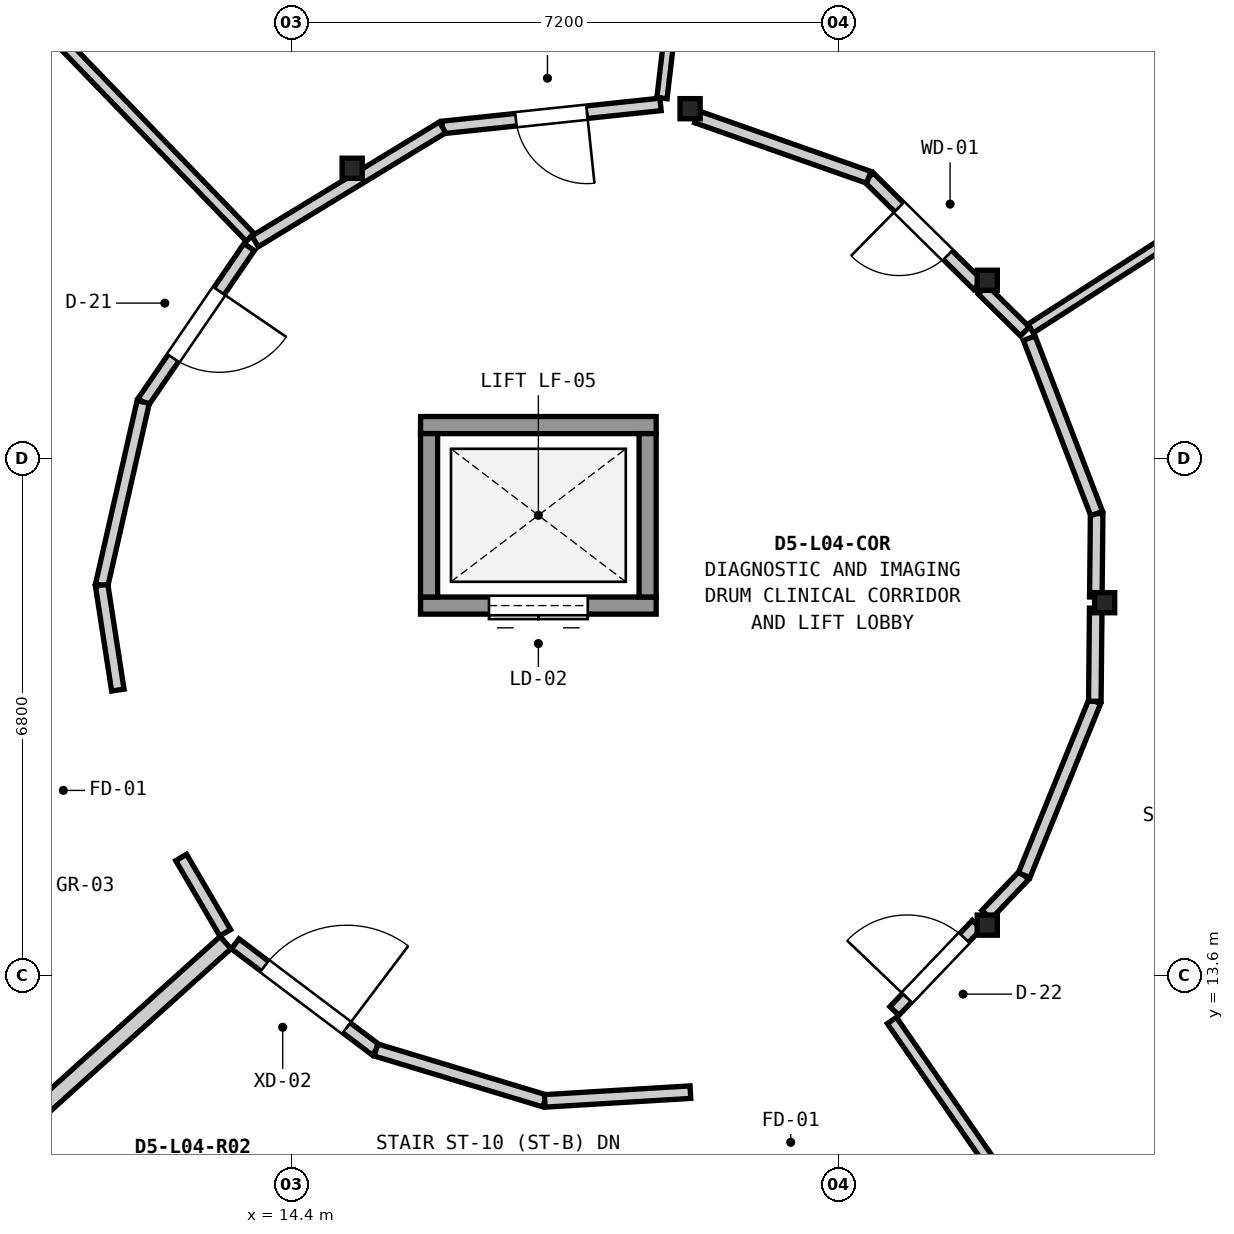
"""IFC4 building model, lengths in metres.
Left out: names, types, materials, properties, quantities, classifications, styles, units other than length and angle.
Written with IfcOpenShell. Run it as: python <this file> out.ifc"""

import sys

from ifc_helpers import new_model, si_unit, direction, frame, frame_2d, origin, origin_2d, place, context, subcontext, project, spatial, rectangle, extrude, element, fill, save


model = new_model("IFC4")
c1 = context("Model", 3, precision=1e-05, world=origin(), true_north=direction((0.0, 1.0)))
c2 = subcontext(c1, "Body", "Model", "MODEL_VIEW")
j1 = project(units=[si_unit("LENGTHUNIT", "METRE"), si_unit("PLANEANGLEUNIT", "RADIAN")], contexts=[c1])
p1 = place(None, origin())
s1 = spatial("IfcSite", under=j1, at=p1, CompositionType="ELEMENT")
p2 = place(p1, origin())
s2 = spatial("IfcBuilding", under=s1, at=p2, CompositionType="ELEMENT")
p3 = place(p2, frame((0.0, 0.0, 17.15)))
s3 = spatial("IfcBuildingStorey", under=s2, at=p3, CompositionType="ELEMENT", Elevation=17.15)
for number, where, z_axis, x_axis in (
    (1, (25.1, 18.5, 0.0), (0.0, 0.0, 1.0), (1.0, 0.0, 0.0)),
    (2, (23.556, 22.742, 0.0), (0.0, 0.0, 1.0), (1.0, 0.0, 0.0)),
    (3, (19.646, 25.0, 0.0), (0.0, 0.0, 1.0), (1.0, 0.0, 0.0)),
    (4, (15.2, 24.216, 0.0), (0.0, 0.0, 1.0), (1.0, 0.0, 0.0)),
    (5, (23.556, 14.258, 0.0), (0.0, 0.0, 1.0), (1.0, 0.0, 0.0)),
):
    element("IfcColumn", number, at=place(p3, frame(where, z_axis=z_axis, x_axis=x_axis)), inside=s3, PredefinedType="COLUMN", context=c2, shape_type="SweptSolid", body=[
        extrude(rectangle(XDim=0.265, YDim=0.265, at=origin_2d()), origin(), (0.0, 0.0, 1.0), 4.2),
    ])
p4 = place(p3, frame((16.1, 18.462, 0.0), z_axis=(0.0, 0.0, 1.0), x_axis=(1.0, 0.0, 0.0)))
e6 = element("IfcWall", 6, at=p4, inside=s3, PredefinedType="SHEAR", context=c2, shape_type="SweptSolid", body=[
    extrude(rectangle(XDim=3.1, YDim=0.225, at=frame_2d((1.55, 0.0))), origin(), (0.0, 0.0, 1.0), 3.96),
])
p5 = place(p4, frame((0.9, 0.0, 0.0)))
e7 = element("IfcOpeningElement", 7, at=p5, cuts=e6, PredefinedType="OPENING", context=c2, shape_type="SweptSolid", body=[
    extrude(rectangle(XDim=1.3, YDim=2.2, at=frame_2d((0.65, 1.1))), frame((0.0, 0.123, 0.0), z_axis=(0.0, -1.0, 0.0), x_axis=(1.0, 0.0, 0.0)), (0.0, 0.0, 1.0), 0.245),
])
p6 = place(p3, frame((16.1, 20.837, 0.0), z_axis=(0.0, 0.0, 1.0), x_axis=(1.0, 0.0, 0.0)))
e8 = element("IfcWall", 8, at=p6, inside=s3, PredefinedType="SHEAR", context=c2, shape_type="SweptSolid", body=[
    extrude(rectangle(XDim=3.1, YDim=0.225, at=frame_2d((1.55, 0.0))), origin(), (0.0, 0.0, 1.0), 3.96),
])
for number, where, z_axis, x_axis in (
    (9, (16.212, 18.575, 0.0), (0.0, 0.0, 1.0), (0.0, 1.0, 0.0)),
    (10, (19.087, 18.575, 0.0), (0.0, 0.0, 1.0), (0.0, 1.0, 0.0)),
):
    element("IfcWall", number, at=place(p3, frame(where, z_axis=z_axis, x_axis=x_axis)), inside=s3, PredefinedType="SHEAR", context=c2, shape_type="SweptSolid", body=[
        extrude(rectangle(XDim=2.15, YDim=0.225, at=frame_2d((1.075, 0.0))), origin(), (0.0, 0.0, 1.0), 3.96),
    ])
p7 = place(p3, frame((13.858, 23.307, 0.0), z_axis=(0.0, 0.0, 1.0), x_axis=(-0.694751659022, 0.719249700928, 0.0)))
e11 = element("IfcWall", 11, at=p7, inside=s3, PredefinedType="PARTITIONING", context=c2, shape_type="SweptSolid", body=[
    extrude(rectangle(XDim=4.574, YDim=0.145, at=frame_2d((2.287, 0.0))), origin(), (0.0, 0.0, 1.0), 3.279),
])
p8 = place(p3, frame((13.534, 14.028, 0.0), z_axis=(0.0, 0.0, 1.0), x_axis=(-0.743275623073, -0.668985312354, 0.0)))
e12 = element("IfcWall", 12, at=p8, inside=s3, PredefinedType="SOLIDWALL", context=c2, shape_type="SweptSolid", body=[
    extrude(rectangle(XDim=4.588, YDim=0.215, at=frame_2d((2.294, 0.0))), origin(), (0.0, 0.0, 1.0), 3.279),
])
p9 = place(p3, frame((22.301, 13.003, 0.0), z_axis=(0.0, 0.0, 1.0), x_axis=(0.56891282969, -0.822397830867, 0.0)))
e13 = element("IfcWall", 13, at=p9, inside=s3, PredefinedType="PARTITIONING", context=c2, shape_type="SweptSolid", body=[
    extrude(rectangle(XDim=4.572, YDim=0.145, at=frame_2d((2.286, 0.0))), origin(), (0.0, 0.0, 1.0), 3.279),
])
p10 = place(p3, frame((24.126, 22.107, 0.0), z_axis=(0.0, 0.0, 1.0), x_axis=(0.841804640469, 0.53978231472, 0.0)))
e14 = element("IfcWall", 14, at=p10, inside=s3, PredefinedType="PLUMBINGWALL", context=c2, shape_type="SweptSolid", body=[
    extrude(rectangle(XDim=4.582, YDim=0.135, at=frame_2d((2.291, 0.0))), origin(), (0.0, 0.0, 1.0), 3.279),
])
p11 = place(p3, frame((19.276, 25.138, 0.0), z_axis=(0.0, 0.0, 1.0), x_axis=(0.116014889471, 0.99324747441, 0.0)))
e15 = element("IfcWall", 15, at=p11, inside=s3, PredefinedType="PLUMBINGWALL", context=c2, shape_type="SweptSolid", body=[
    extrude(rectangle(XDim=4.577, YDim=0.135, at=frame_2d((2.289, 0.0))), origin(), (0.0, 0.0, 1.0), 3.279),
])
p12 = place(p3, frame((13.845, 23.179, 0.0), z_axis=(0.0, 0.0, 1.0), x_axis=(-0.564379150031, -0.825515702462, 0.0)))
e16 = element("IfcWall", 16, at=p12, inside=s3, PredefinedType="PARTITIONING", context=c2, shape_type="SweptSolid", body=[
    extrude(rectangle(XDim=2.47, YDim=0.165, at=frame_2d((1.235, 0.0))), origin(), (0.0, 0.0, 1.0), 3.279),
])
p13 = place(p12, frame((0.7, 0.0, 0.0)))
e17 = element("IfcOpeningElement", 17, at=p13, cuts=e16, PredefinedType="OPENING", context=c2, shape_type="SweptSolid", body=[
    extrude(rectangle(XDim=1.07, YDim=2.2, at=frame_2d((0.535, 1.1))), frame((0.0, 0.093, 0.0), z_axis=(0.0, -1.0, 0.0), x_axis=(1.0, 0.0, 0.0)), (0.0, 0.0, 1.0), 0.185),
])
p14 = place(p3, frame((12.451, 21.14, 0.0), z_axis=(0.0, 0.0, 1.0), x_axis=(-0.221300832748, -0.975205589312, 0.0)))
e18 = element("IfcWall", 18, at=p14, inside=s3, PredefinedType="PARTITIONING", context=c2, shape_type="SweptSolid", body=[
    extrude(rectangle(XDim=2.471, YDim=0.165, at=frame_2d((1.236, 0.0))), origin(), (0.0, 0.0, 1.0), 3.279),
])
p15 = place(p3, frame((11.904, 18.73, 0.0), z_axis=(0.0, 0.0, 1.0), x_axis=(0.15247764233, -0.988306920238, 0.0)))
e19 = element("IfcWall", 19, at=p15, inside=s3, PredefinedType="PARTITIONING", context=c2, shape_type="SweptSolid", body=[
    extrude(rectangle(XDim=1.396, YDim=0.165, at=frame_2d((0.698, 0.0))), origin(), (0.0, 0.0, 1.0), 3.279),
])
p16 = place(p3, frame((12.95, 15.148, 0.0), z_axis=(0.0, 0.0, 1.0), x_axis=(0.505179201569, -0.863014469347, 0.0)))
e20 = element("IfcWall", 20, at=p16, inside=s3, PredefinedType="PARTITIONING", context=c2, shape_type="SweptSolid", body=[
    extrude(rectangle(XDim=1.148, YDim=0.165, at=frame_2d((0.574, 0.0))), origin(), (0.0, 0.0, 1.0), 3.279),
])
p17 = place(p3, frame((13.661, 14.011, 0.0), z_axis=(0.0, 0.0, 1.0), x_axis=(0.798557639329, -0.601918347177, 0.0)))
e21 = element("IfcWall", 21, at=p17, inside=s3, PredefinedType="PARTITIONING", context=c2, shape_type="SweptSolid", body=[
    extrude(rectangle(XDim=2.319, YDim=0.165, at=frame_2d((1.16, 0.0))), origin(), (0.0, 0.0, 1.0), 3.279),
])
p18 = place(p17, frame((0.485, 0.0, 0.0)))
e22 = element("IfcOpeningElement", 22, at=p18, cuts=e21, PredefinedType="OPENING", context=c2, shape_type="SweptSolid", body=[
    extrude(rectangle(XDim=1.35, YDim=2.22, at=frame_2d((0.675, 1.11))), frame((0.0, 0.093, 0.0), z_axis=(0.0, -1.0, 0.0), x_axis=(1.0, 0.0, 0.0)), (0.0, 0.0, 1.0), 0.185),
])
p19 = place(p3, frame((15.513, 12.615, 0.0), z_axis=(0.0, 0.0, 1.0), x_axis=(0.957393612843, -0.288786201346, 0.0)))
e23 = element("IfcWall", 23, at=p19, inside=s3, PredefinedType="PARTITIONING", context=c2, shape_type="SweptSolid", body=[
    extrude(rectangle(XDim=2.32, YDim=0.165, at=frame_2d((1.16, 0.0))), origin(), (0.0, 0.0, 1.0), 3.279),
])
p20 = place(p3, frame((17.734, 11.945, 0.0), z_axis=(0.0, 0.0, 1.0), x_axis=(0.998203932851, 0.059907499028, 0.0)))
e24 = element("IfcWall", 24, at=p20, inside=s3, PredefinedType="PARTITIONING", context=c2, shape_type="SweptSolid", body=[
    extrude(rectangle(XDim=1.919, YDim=0.165, at=frame_2d((0.96, 0.0))), origin(), (0.0, 0.0, 1.0), 3.279),
])
p21 = place(p3, frame((22.334, 13.128, 0.0), z_axis=(0.0, 0.0, 1.0), x_axis=(0.69098960796, 0.722864691136, 0.0)))
e25 = element("IfcWall", 25, at=p21, inside=s3, PredefinedType="PARTITIONING", context=c2, shape_type="SweptSolid", body=[
    extrude(rectangle(XDim=1.57, YDim=0.165, at=frame_2d((0.785, 0.0))), origin(), (0.0, 0.0, 1.0), 3.279),
])
p22 = place(p21, frame((0.24, 0.0, 0.0)))
e26 = element("IfcOpeningElement", 26, at=p22, cuts=e25, PredefinedType="OPENING", context=c2, shape_type="SweptSolid", body=[
    extrude(rectangle(XDim=1.09, YDim=2.22, at=frame_2d((0.545, 1.11))), frame((0.0, 0.093, 0.0), z_axis=(0.0, -1.0, 0.0), x_axis=(1.0, 0.0, 0.0)), (0.0, 0.0, 1.0), 0.185),
])
p23 = place(p3, frame((23.545, 14.395, 0.0), z_axis=(0.0, 0.0, 1.0), x_axis=(0.690944661627, 0.722907652864, 0.0)))
e27 = element("IfcWall", 27, at=p23, inside=s3, PredefinedType="PARTITIONING", context=c2, shape_type="SweptSolid", body=[
    extrude(rectangle(XDim=0.718, YDim=0.165, at=frame_2d((0.359, 0.0))), origin(), (0.0, 0.0, 1.0), 3.279),
])
p24 = place(p3, frame((24.041, 14.914, 0.0), z_axis=(0.0, 0.0, 1.0), x_axis=(0.376411505865, 0.926452577444, 0.0)))
e28 = element("IfcWall", 28, at=p24, inside=s3, PredefinedType="PARTITIONING", context=c2, shape_type="SweptSolid", body=[
    extrude(rectangle(XDim=2.47, YDim=0.165, at=frame_2d((1.235, 0.0))), origin(), (0.0, 0.0, 1.0), 3.279),
])
p25 = place(p3, frame((24.971, 17.203, 0.0), z_axis=(0.0, 0.0, 1.0), x_axis=(0.009764381036, 0.999952327295, 0.0)))
e29 = element("IfcWall", 29, at=p25, inside=s3, PredefinedType="PARTITIONING", context=c2, shape_type="SweptSolid", body=[
    extrude(rectangle(XDim=1.225, YDim=0.165, at=frame_2d((0.613, 0.0))), origin(), (0.0, 0.0, 1.0), 3.279),
])
p26 = place(p3, frame((24.984, 18.574, 0.0), z_axis=(0.0, 0.0, 1.0), x_axis=(0.010217147704, 0.999947803584, 0.0)))
e30 = element("IfcWall", 30, at=p26, inside=s3, PredefinedType="PARTITIONING", context=c2, shape_type="SweptSolid", body=[
    extrude(rectangle(XDim=1.099, YDim=0.165, at=frame_2d((0.55, 0.0))), origin(), (0.0, 0.0, 1.0), 3.279),
])
p27 = place(p3, frame((24.995, 19.673, 0.0), z_axis=(0.0, 0.0, 1.0), x_axis=(-0.358959221796, 0.933353243465, 0.0)))
e31 = element("IfcWall", 31, at=p27, inside=s3, PredefinedType="PARTITIONING", context=c2, shape_type="SweptSolid", body=[
    extrude(rectangle(XDim=2.472, YDim=0.165, at=frame_2d((1.236, 0.0))), origin(), (0.0, 0.0, 1.0), 3.279),
])
p28 = place(p3, frame((24.051, 22.07, 0.0), z_axis=(0.0, 0.0, 1.0), x_axis=(-0.711623901059, 0.702560619051, 0.0)))
e32 = element("IfcWall", 32, at=p28, inside=s3, PredefinedType="PARTITIONING", context=c2, shape_type="SweptSolid", body=[
    extrude(rectangle(XDim=0.781, YDim=0.165, at=frame_2d((0.391, 0.0))), origin(), (0.0, 0.0, 1.0), 3.279),
])
p29 = place(p3, frame((23.434, 22.68, 0.0), z_axis=(0.0, 0.0, 1.0), x_axis=(-0.712049294093, 0.70212947722, 0.0)))
e33 = element("IfcWall", 33, at=p29, inside=s3, PredefinedType="PARTITIONING", context=c2, shape_type="SweptSolid", body=[
    extrude(rectangle(XDim=2.018, YDim=0.165, at=frame_2d((1.009, 0.0))), origin(), (0.0, 0.0, 1.0), 3.279),
])
p30 = place(p29, frame((0.559, 0.0, 0.0)))
e34 = element("IfcOpeningElement", 34, at=p30, cuts=e33, PredefinedType="OPENING", context=c2, shape_type="SweptSolid", body=[
    extrude(rectangle(XDim=0.9, YDim=2.1, at=frame_2d((0.45, 1.05))), frame((0.0, 0.093, 0.0), z_axis=(0.0, -1.0, 0.0), x_axis=(1.0, 0.0, 0.0)), (0.0, 0.0, 1.0), 0.185),
])
p31 = place(p3, frame((21.997, 24.097, 0.0), z_axis=(0.0, 0.0, 1.0), x_axis=(-0.943378428423, 0.331718466151, 0.0)))
e35 = element("IfcWall", 35, at=p31, inside=s3, PredefinedType="PARTITIONING", context=c2, shape_type="SweptSolid", body=[
    extrude(rectangle(XDim=2.4, YDim=0.165, at=frame_2d((1.2, 0.0))), origin(), (0.0, 0.0, 1.0), 3.279),
])
p32 = place(p3, frame((19.257, 25.056, 0.0), z_axis=(0.0, 0.0, 1.0), x_axis=(-0.994470622132, -0.105015149938, 0.0)))
e36 = element("IfcWall", 36, at=p32, inside=s3, PredefinedType="PARTITIONING", context=c2, shape_type="SweptSolid", body=[
    extrude(rectangle(XDim=2.885, YDim=0.165, at=frame_2d((1.442, 0.0))), origin(), (0.0, 0.0, 1.0), 3.279),
])
p33 = place(p32, frame((0.973, 0.0, 0.0)))
e37 = element("IfcOpeningElement", 37, at=p33, cuts=e36, PredefinedType="OPENING", context=c2, shape_type="SweptSolid", body=[
    extrude(rectangle(XDim=0.94, YDim=2.1, at=frame_2d((0.47, 1.05))), frame((0.0, 0.093, 0.0), z_axis=(0.0, -1.0, 0.0), x_axis=(1.0, 0.0, 0.0)), (0.0, 0.0, 1.0), 0.185),
])
p34 = place(p3, frame((16.388, 24.753, 0.0), z_axis=(0.0, 0.0, 1.0), x_axis=(-0.854492488108, -0.519463750196, 0.0)))
e38 = element("IfcWall", 38, at=p34, inside=s3, PredefinedType="PARTITIONING", context=c2, shape_type="SweptSolid", body=[
    extrude(rectangle(XDim=2.886, YDim=0.165, at=frame_2d((1.443, 0.0))), origin(), (0.0, 0.0, 1.0), 3.279),
])
p35 = place(p5, origin())
e39 = element("IfcDoor", 39, at=p35, inside=s3, OperationType="DOUBLE_DOOR_SLIDING", PredefinedType="DOOR", context=c2, shape_type="SweptSolid", body=[
    extrude(rectangle(XDim=1.3, YDim=2.2, at=frame_2d((0.65, 1.1))), frame((0.0, 0.025, 0.0), z_axis=(0.0, -1.0, 0.0), x_axis=(1.0, 0.0, 0.0)), (0.0, 0.0, 1.0), 0.05),
])
fill(e7, e39)
p36 = place(p13, origin())
e40 = element("IfcDoor", 40, at=p36, inside=s3, OperationType="SINGLE_SWING_LEFT", PredefinedType="DOOR", context=c2, shape_type="SweptSolid", body=[
    extrude(rectangle(XDim=1.07, YDim=2.2, at=frame_2d((0.535, 1.1))), frame((0.0, 0.025, 0.0), z_axis=(0.0, -1.0, 0.0), x_axis=(1.0, 0.0, 0.0)), (0.0, 0.0, 1.0), 0.05),
])
fill(e17, e40)
p37 = place(p18, origin())
e41 = element("IfcDoor", 41, at=p37, inside=s3, OperationType="SINGLE_SWING_RIGHT", PredefinedType="DOOR", context=c2, shape_type="SweptSolid", body=[
    extrude(rectangle(XDim=1.35, YDim=2.22, at=frame_2d((0.675, 1.11))), frame((0.0, 0.025, 0.0), z_axis=(0.0, -1.0, 0.0), x_axis=(1.0, 0.0, 0.0)), (0.0, 0.0, 1.0), 0.05),
])
fill(e22, e41)
p38 = place(p22, origin())
e42 = element("IfcDoor", 42, at=p38, inside=s3, OperationType="SINGLE_SWING_LEFT", PredefinedType="DOOR", context=c2, shape_type="SweptSolid", body=[
    extrude(rectangle(XDim=1.09, YDim=2.22, at=frame_2d((0.545, 1.11))), frame((0.0, 0.025, 0.0), z_axis=(0.0, -1.0, 0.0), x_axis=(1.0, 0.0, 0.0)), (0.0, 0.0, 1.0), 0.05),
])
fill(e26, e42)
p39 = place(p30, origin())
e43 = element("IfcDoor", 43, at=p39, inside=s3, OperationType="SINGLE_SWING_RIGHT", PredefinedType="DOOR", context=c2, shape_type="SweptSolid", body=[
    extrude(rectangle(XDim=0.9, YDim=2.1, at=frame_2d((0.45, 1.05))), frame((0.0, 0.025, 0.0), z_axis=(0.0, -1.0, 0.0), x_axis=(1.0, 0.0, 0.0)), (0.0, 0.0, 1.0), 0.05),
])
fill(e34, e43)
p40 = place(p33, origin())
e44 = element("IfcDoor", 44, at=p40, inside=s3, OperationType="SINGLE_SWING_LEFT", PredefinedType="DOOR", context=c2, shape_type="SweptSolid", body=[
    extrude(rectangle(XDim=0.94, YDim=2.1, at=frame_2d((0.47, 1.05))), frame((0.0, 0.025, 0.0), z_axis=(0.0, -1.0, 0.0), x_axis=(1.0, 0.0, 0.0)), (0.0, 0.0, 1.0), 0.05),
])
fill(e37, e44)
save(model, sys.argv[1])
